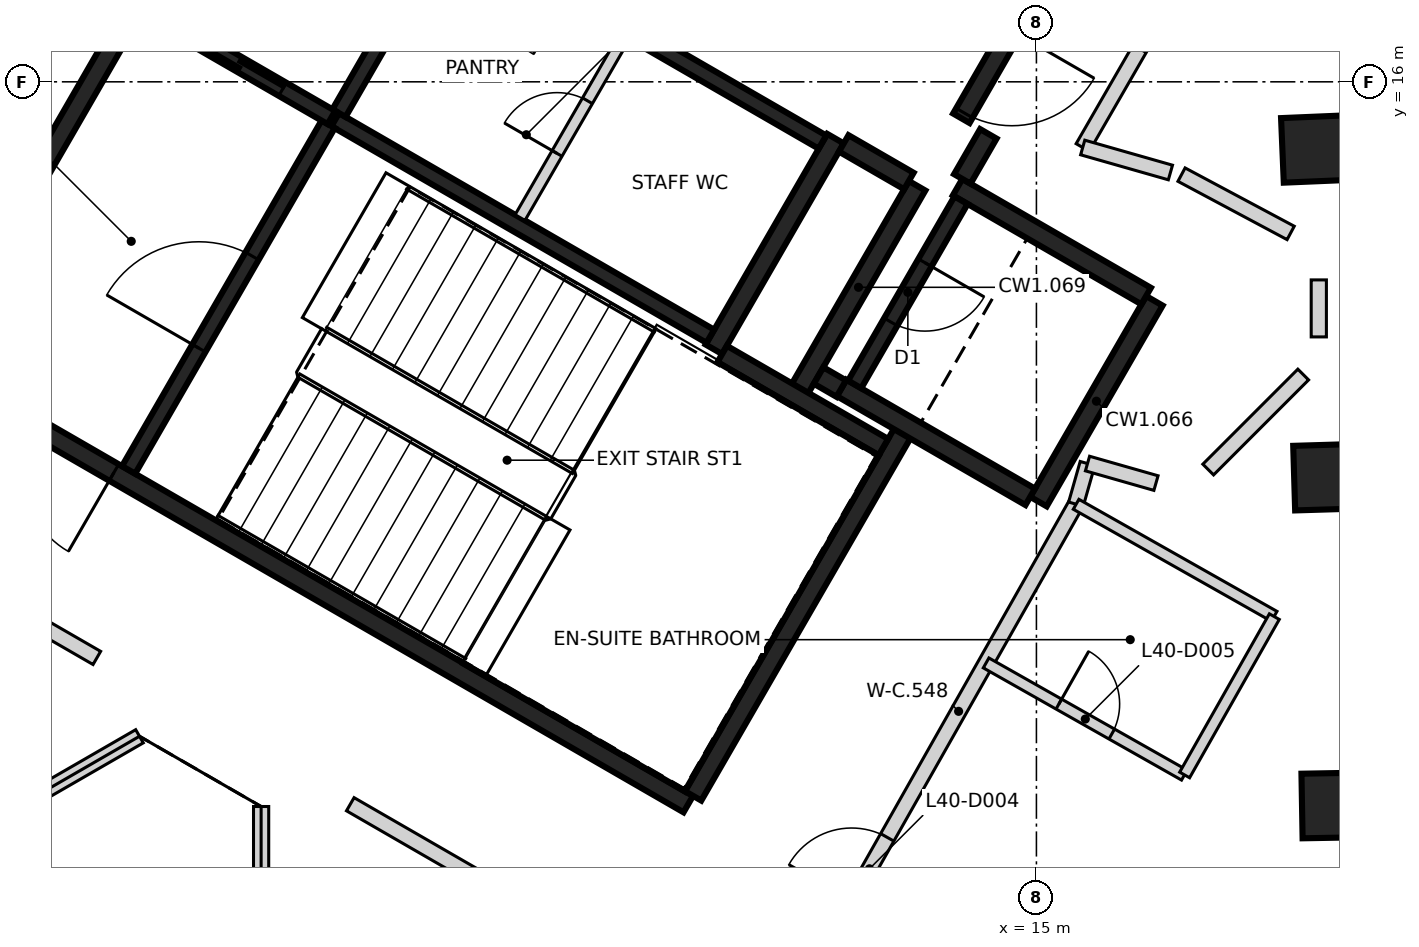
"""IFC4 building model, lengths in metres.
Left out: names, types, materials, properties, quantities, classifications, styles, units other than length and angle.
Written with IfcOpenShell. Run it as: python <this file> out.ifc"""

import sys

from ifc_helpers import new_model, si_unit, direction, frame, frame_2d, origin, origin_2d, place, context, subcontext, project, spatial, rectangle, extrude, element, fill, save


model = new_model("IFC4")
c1 = context("Model", 3, precision=1e-05, world=origin(), true_north=direction((0.0, 1.0)))
c2 = subcontext(c1, "Body", "Model", "MODEL_VIEW")
j1 = project(units=[si_unit("LENGTHUNIT", "METRE"), si_unit("PLANEANGLEUNIT", "RADIAN")], contexts=[c1])
p1 = place(None, origin())
s1 = spatial("IfcSite", under=j1, at=p1, CompositionType="ELEMENT")
p2 = place(p1, origin())
s2 = spatial("IfcBuilding", under=s1, at=p2, CompositionType="ELEMENT")
p3 = place(p2, frame((0.0, 0.0, 161.2)))
s3 = spatial("IfcBuildingStorey", under=s2, at=p3, CompositionType="ELEMENT", Elevation=161.2)
for number, where, z_axis, x_axis in (
    (1, (19.119, 6.484, -0.4), (0.0, 0.0, 1.0), (1.0, 0.018, 0.0)),
    (2, (19.016, 10.805, -0.4), (0.0, 0.0, 1.0), (1.0, 0.03, 0.0)),
    (3, (18.861, 15.124, -0.4), (0.0, 0.0, 1.0), (0.999, 0.042, 0.0)),
):
    element("IfcColumn", number, at=place(p3, frame(where, z_axis=z_axis, x_axis=x_axis)), inside=s3, PredefinedType="COLUMN", context=c2, shape_type="SweptSolid", body=[
        extrude(rectangle(XDim=1.25, YDim=0.85, at=origin_2d()), origin(), (0.0, 0.0, 1.0), 2.884),
    ])
p4 = place(p3, frame((10.42, 6.498, 0.0), z_axis=(0.0, 0.0, 1.0), x_axis=(-0.866021906294, 0.500006057782, 0.0)))
e4 = element("IfcWall", 4, at=p4, inside=s3, PredefinedType="SHEAR", context=c2, shape_type="SweptSolid", body=[
    extrude(rectangle(XDim=11.55, YDim=0.25, at=frame_2d((5.775, 0.0))), origin(), (0.0, 0.0, 1.0), 3.2),
])
p5 = place(p4, frame((10.025, 0.0, 0.0)))
e5 = element("IfcOpeningElement", 5, at=p5, cuts=e4, PredefinedType="OPENING", context=c2, shape_type="SweptSolid", body=[
    extrude(rectangle(XDim=1.2, YDim=2.1, at=frame_2d((0.6, 1.05))), frame((0.0, 0.135, 0.0), z_axis=(0.0, -1.0, 0.0), x_axis=(1.0, 0.0, 0.0)), (0.0, 0.0, 1.0), 0.27),
])
p6 = place(p4, frame((8.725, 0.0, 0.0)))
e6 = element("IfcOpeningElement", 6, at=p6, cuts=e4, PredefinedType="OPENING", context=c2, shape_type="SweptSolid", body=[
    extrude(rectangle(XDim=1.2, YDim=2.1, at=frame_2d((0.6, 1.05))), frame((0.0, 0.135, 0.0), z_axis=(0.0, -1.0, 0.0), x_axis=(1.0, 0.0, 0.0)), (0.0, 0.0, 1.0), 0.27),
])
p7 = place(p3, frame((0.48, 12.381, 0.0), z_axis=(0.0, 0.0, 1.0), x_axis=(0.49999885962, 0.866026062182, 0.0)))
e7 = element("IfcWall", 7, at=p7, inside=s3, PredefinedType="SHEAR", context=c2, shape_type="SweptSolid", body=[
    extrude(rectangle(XDim=5.225, YDim=0.25, at=frame_2d((2.612, 0.0))), origin(), (0.0, 0.0, 1.0), 3.2),
])
p8 = place(p3, frame((13.238, 11.378, 0.0), z_axis=(0.0, 0.0, 1.0), x_axis=(-0.500008851346, -0.866020293397, 0.0)))
e8 = element("IfcWall", 8, at=p8, inside=s3, PredefinedType="SHEAR", context=c2, shape_type="SweptSolid", body=[
    extrude(rectangle(XDim=5.51, YDim=0.25, at=frame_2d((2.755, 0.0))), origin(), (0.0, 0.0, 1.0), 3.2),
])
p9 = place(p3, frame((12.357, 15.252, 0.0), z_axis=(0.0, 0.0, 1.0), x_axis=(-0.500028443584, -0.866008981251, 0.0)))
e9 = element("IfcWall", 9, at=p9, inside=s3, PredefinedType="SHEAR", context=c2, shape_type="SweptSolid", body=[
    extrude(rectangle(XDim=3.2, YDim=0.25, at=frame_2d((1.6, 0.0))), origin(), (0.0, 0.0, 1.0), 3.2),
])
p10 = place(p3, frame((16.552, 13.119, 0.0), z_axis=(0.0, 0.0, 1.0), x_axis=(-0.499978833458, -0.866037623948, 0.0)))
e10 = element("IfcWall", 10, at=p10, inside=s3, PredefinedType="SHEAR", context=c2, shape_type="SweptSolid", body=[
    extrude(rectangle(XDim=3.05, YDim=0.25, at=frame_2d((1.525, 0.0))), origin(), (0.0, 0.0, 1.0), 3.2),
])
p11 = place(p3, frame((14.918, 10.54, 0.0), z_axis=(0.0, 0.0, 1.0), x_axis=(-0.866063538972, 0.499933942099, 0.0)))
e11 = element("IfcWall", 11, at=p11, inside=s3, PredefinedType="SHEAR", context=c2, shape_type="SweptSolid", body=[
    extrude(rectangle(XDim=2.865, YDim=0.25, at=frame_2d((1.432, 0.0))), origin(), (0.0, 0.0, 1.0), 3.2),
])
p12 = place(p3, frame((13.963, 14.614, 0.0), z_axis=(0.0, 0.0, 1.0), x_axis=(0.866042235819, -0.499970844928, 0.0)))
e12 = element("IfcWall", 12, at=p12, inside=s3, PredefinedType="SHEAR", context=c2, shape_type="SweptSolid", body=[
    extrude(rectangle(XDim=2.865, YDim=0.25, at=frame_2d((1.432, 0.0))), origin(), (0.0, 0.0, 1.0), 3.2),
])
p13 = place(p3, frame((11.888, 11.961, 0.0), z_axis=(0.0, 0.0, 1.0), x_axis=(0.500003324108, 0.866023484601, 0.0)))
e13 = element("IfcWall", 13, at=p13, inside=s3, PredefinedType="SHEAR", context=c2, shape_type="SweptSolid", body=[
    extrude(rectangle(XDim=3.085, YDim=0.25, at=frame_2d((1.542, 0.0))), origin(), (0.0, 0.0, 1.0), 3.2),
])
p14 = place(p3, frame((10.865, 12.418, 0.0), z_axis=(0.0, 0.0, 1.0), x_axis=(0.866026229868, -0.499998569178, 0.0)))
e14 = element("IfcWall", 14, at=p14, inside=s3, PredefinedType="SHEAR", context=c2, shape_type="SweptSolid", body=[
    extrude(rectangle(XDim=2.449, YDim=0.25, at=frame_2d((1.225, 0.0))), origin(), (0.0, 0.0, 1.0), 3.2),
])
p15 = place(p3, frame((14.945, 17.135, 0.0), z_axis=(0.0, 0.0, 1.0), x_axis=(-0.499983108224, -0.866035156036, 0.0)))
e15 = element("IfcWall", 15, at=p15, inside=s3, PredefinedType="SHEAR", context=c2, shape_type="SweptSolid", body=[
    extrude(rectangle(XDim=1.865, YDim=0.25, at=frame_2d((0.932, 0.0))), origin(), (0.0, 0.0, 1.0), 3.2),
])
p16 = place(p15, frame((0.535, 0.0, 0.0)))
e16 = element("IfcOpeningElement", 16, at=p16, cuts=e15, PredefinedType="OPENING", context=c2, shape_type="SweptSolid", body=[
    extrude(rectangle(XDim=1.25, YDim=2.1, at=frame_2d((0.625, 1.05))), frame((0.0, 0.135, 0.0), z_axis=(0.0, -1.0, 0.0), x_axis=(1.0, 0.0, 0.0)), (0.0, 0.0, 1.0), 0.27),
])
p17 = place(p3, frame((13.322, 14.695, 0.0), z_axis=(0.0, 0.0, 1.0), x_axis=(-0.866017078145, 0.500014420154, 0.0)))
e17 = element("IfcWall", 17, at=p17, inside=s3, PredefinedType="SHEAR", context=c2, shape_type="SweptSolid", body=[
    extrude(rectangle(XDim=0.989, YDim=0.25, at=frame_2d((0.495, 0.0))), origin(), (0.0, 0.0, 1.0), 3.2),
])
p18 = place(p3, frame((14.368, 15.315, 0.0), z_axis=(0.0, 0.0, 1.0), x_axis=(-0.499897359611, -0.866084655132, 0.0)))
e18 = element("IfcWall", 18, at=p18, inside=s3, PredefinedType="SHEAR", context=c2, shape_type="SweptSolid", body=[
    extrude(rectangle(XDim=0.685, YDim=0.25, at=frame_2d((0.342, 0.0))), origin(), (0.0, 0.0, 1.0), 3.2),
])
p19 = place(p3, frame((12.433, 11.964, 0.0), z_axis=(0.0, 0.0, 1.0), x_axis=(-0.866055875208, 0.499947218231, 0.0)))
e19 = element("IfcWall", 19, at=p19, inside=s3, PredefinedType="SHEAR", context=c2, shape_type="SweptSolid", body=[
    extrude(rectangle(XDim=0.345, YDim=0.25, at=frame_2d((0.172, 0.0))), origin(), (0.0, 0.0, 1.0), 3.2),
])
p20 = place(p3, frame((5.775, 15.502, 0.0), z_axis=(0.0, 0.0, 1.0), x_axis=(0.866020080793, -0.500009219579, 0.0)))
e20 = element("IfcWall", 20, at=p20, inside=s3, PredefinedType="SHEAR", context=c2, shape_type="SweptSolid", body=[
    extrude(rectangle(XDim=5.699, YDim=0.2, at=frame_2d((2.85, 0.0))), origin(), (0.0, 0.0, 1.0), 3.2),
])
p21 = place(p3, frame((12.185, 15.207, 0.0), z_axis=(0.0, 0.0, 1.0), x_axis=(-0.866020080793, 0.500009219579, 0.0)))
e21 = element("IfcWall", 21, at=p21, inside=s3, PredefinedType="SHEAR", context=c2, shape_type="SweptSolid", body=[
    extrude(rectangle(XDim=5.699, YDim=0.2, at=frame_2d((2.85, 0.0))), origin(), (0.0, 0.0, 1.0), 3.2),
])
p22 = place(p21, frame((3.874, 0.0, 0.0)))
e22 = element("IfcOpeningElement", 22, at=p22, cuts=e21, PredefinedType="OPENING", context=c2, shape_type="SweptSolid", body=[
    extrude(rectangle(XDim=0.9, YDim=2.1, at=frame_2d((0.45, 1.05))), frame((0.0, 0.11, 0.0), z_axis=(0.0, -1.0, 0.0), x_axis=(1.0, 0.0, 0.0)), (0.0, 0.0, 1.0), 0.22),
])
p23 = place(p3, frame((3.057, 10.895, 0.0), z_axis=(0.0, 0.0, 1.0), x_axis=(0.499989418164, 0.866031513124, 0.0)))
e23 = element("IfcWall", 23, at=p23, inside=s3, PredefinedType="SHEAR", context=c2, shape_type="SweptSolid", body=[
    extrude(rectangle(XDim=5.251, YDim=0.2, at=frame_2d((2.625, 0.0))), origin(), (0.0, 0.0, 1.0), 3.2),
])
p24 = place(p23, frame((1.849, 0.0, 0.0)))
e24 = element("IfcOpeningElement", 24, at=p24, cuts=e23, PredefinedType="OPENING", context=c2, shape_type="SweptSolid", body=[
    extrude(rectangle(XDim=1.4, YDim=2.1, at=frame_2d((0.7, 1.05))), frame((0.0, 0.11, 0.0), z_axis=(0.0, -1.0, 0.0), x_axis=(1.0, 0.0, 0.0)), (0.0, 0.0, 1.0), 0.22),
])
p25 = place(p3, frame((14.008, 14.442, 0.0), z_axis=(0.0, 0.0, 1.0), x_axis=(-0.499986818241, -0.866033014143, 0.0)))
e25 = element("IfcWall", 25, at=p25, inside=s3, PredefinedType="SHEAR", context=c2, shape_type="SweptSolid", body=[
    extrude(rectangle(XDim=2.798, YDim=0.2, at=frame_2d((1.399, 0.0))), origin(), (0.0, 0.0, 1.0), 3.2),
])
p26 = place(p25, frame((0.949, 0.0, 0.0)))
e26 = element("IfcOpeningElement", 26, at=p26, cuts=e25, PredefinedType="OPENING", context=c2, shape_type="SweptSolid", body=[
    extrude(rectangle(XDim=0.9, YDim=2.1, at=frame_2d((0.45, 1.05))), frame((0.0, 0.11, 0.0), z_axis=(0.0, -1.0, 0.0), x_axis=(1.0, 0.0, 0.0)), (0.0, 0.0, 1.0), 0.22),
])
p27 = place(p3, frame((7.199, 17.97, 0.0), z_axis=(0.0, 0.0, 1.0), x_axis=(-0.499968400327, -0.866043647095, 0.0)))
e27 = element("IfcWall", 27, at=p27, inside=s3, PredefinedType="SHEAR", context=c2, shape_type="SweptSolid", body=[
    extrude(rectangle(XDim=2.75, YDim=0.2, at=frame_2d((1.375, 0.0))), origin(), (0.0, 0.0, 1.0), 3.2),
])
p28 = place(p3, frame((5.725, 15.531, 0.0), z_axis=(0.0, 0.0, 1.0), x_axis=(-0.866037306777, 0.499979382845, 0.0)))
e28 = element("IfcWall", 28, at=p28, inside=s3, PredefinedType="SHEAR", context=c2, shape_type="SweptSolid", body=[
    extrude(rectangle(XDim=2.742, YDim=0.2, at=frame_2d((1.371, 0.0))), origin(), (0.0, 0.0, 1.0), 3.2),
])
p29 = place(p28, frame((0.743, 0.0, 0.0)))
e29 = element("IfcOpeningElement", 29, at=p29, cuts=e28, PredefinedType="OPENING", context=c2, shape_type="SweptSolid", body=[
    extrude(rectangle(XDim=1.3, YDim=2.1, at=frame_2d((0.65, 1.05))), frame((0.0, 0.11, 0.0), z_axis=(0.0, -1.0, 0.0), x_axis=(1.0, 0.0, 0.0)), (0.0, 0.0, 1.0), 0.22),
])
p30 = place(p3, frame((8.207, 14.214, 0.0), z_axis=(0.0, 0.0, 1.0), x_axis=(0.499922376475, 0.866070215109, 0.0)))
e30 = element("IfcWall", 30, at=p30, inside=s3, PredefinedType="PARTITIONING", context=c2, shape_type="SweptSolid", body=[
    extrude(rectangle(XDim=2.749, YDim=0.15, at=frame_2d((1.374, 0.0))), origin(), (0.0, 0.0, 1.0), 3.2),
])
p31 = place(p30, frame((0.974, 0.0, 0.0)))
e31 = element("IfcOpeningElement", 31, at=p31, cuts=e30, PredefinedType="OPENING", context=c2, shape_type="SweptSolid", body=[
    extrude(rectangle(XDim=0.8, YDim=2.1, at=frame_2d((0.4, 1.05))), frame((0.0, 0.085, 0.0), z_axis=(0.0, -1.0, 0.0), x_axis=(1.0, 0.0, 0.0)), (0.0, 0.0, 1.0), 0.17),
])
p32 = place(p3, frame((0.612, 9.591, 0.0), z_axis=(0.0, 0.0, 1.0), x_axis=(0.866077886601, -0.499909086075, 0.0)))
e32 = element("IfcWall", 32, at=p32, inside=s3, PredefinedType="PARTITIONING", context=c2, shape_type="SweptSolid", body=[
    extrude(rectangle(XDim=2.34, YDim=0.2, at=frame_2d((1.17, 0.0))), origin(), (0.0, 0.0, 1.0), 3.2),
])
p33 = place(p3, frame((5.973, 6.496, 0.0), z_axis=(0.0, 0.0, 1.0), x_axis=(0.866058792507, -0.499942164577, 0.0)))
e33 = element("IfcWall", 33, at=p33, inside=s3, PredefinedType="PARTITIONING", context=c2, shape_type="SweptSolid", body=[
    extrude(rectangle(XDim=2.341, YDim=0.2, at=frame_2d((1.17, 0.0))), origin(), (0.0, 0.0, 1.0), 3.2),
])
p34 = place(p3, frame((12.433, 4.992, 0.0), z_axis=(0.0, 0.0, 1.0), x_axis=(0.492618265192, 0.870245508348, 0.0)))
e34 = element("IfcWall", 34, at=p34, inside=s3, PredefinedType="PARTITIONING", context=c2, shape_type="SweptSolid", body=[
    extrude(rectangle(XDim=6.265, YDim=0.2, at=frame_2d((3.133, 0.0))), origin(), (0.0, 0.0, 1.0), 3.2),
])
p35 = place(p34, frame((0.277, 0.0, 0.0)))
e35 = element("IfcOpeningElement", 35, at=p35, cuts=e34, PredefinedType="OPENING", context=c2, shape_type="SweptSolid", body=[
    extrude(rectangle(XDim=0.95, YDim=2.1, at=frame_2d((0.475, 1.05))), frame((0.0, 0.11, 0.0), z_axis=(0.0, -1.0, 0.0), x_axis=(1.0, 0.0, 0.0)), (0.0, 0.0, 1.0), 0.22),
])
p36 = place(p3, frame((15.156, 17.13, 0.0), z_axis=(0.0, 0.0, 1.0), x_axis=(0.865755062894, -0.500467952093, 0.0)))
e36 = element("IfcWall", 36, at=p36, inside=s3, PredefinedType="PARTITIONING", context=c2, shape_type="SweptSolid", body=[
    extrude(rectangle(XDim=1.389, YDim=0.2, at=frame_2d((0.694, 0.0))), origin(), (0.0, 0.0, 1.0), 3.2),
])
p37 = place(p3, frame((15.52, 10.444, 0.0), z_axis=(0.0, 0.0, 1.0), x_axis=(0.273965995931, 0.961739378976, 0.0)))
e37 = element("IfcWall", 37, at=p37, inside=s3, PredefinedType="PARTITIONING", context=c2, shape_type="SweptSolid", body=[
    extrude(rectangle(XDim=0.555, YDim=0.2, at=frame_2d((0.278, 0.0))), origin(), (0.0, 0.0, 1.0), 3.2),
])
p38 = place(p3, frame((15.609, 15.136, 0.0), z_axis=(0.0, 0.0, 1.0), x_axis=(0.499501622561, 0.866312950993, 0.0)))
e38 = element("IfcWall", 38, at=p38, inside=s3, PredefinedType="PARTITIONING", context=c2, shape_type="SweptSolid", body=[
    extrude(rectangle(XDim=1.5, YDim=0.2, at=frame_2d((0.75, 0.0))), origin(), (0.0, 0.0, 1.0), 3.2),
])
p39 = place(p3, frame((15.609, 15.136, 0.0), z_axis=(0.0, 0.0, 1.0), x_axis=(0.961662011825, -0.274237442763, 0.0)))
e39 = element("IfcWall", 39, at=p39, inside=s3, PredefinedType="PARTITIONING", context=c2, shape_type="SweptSolid", body=[
    extrude(rectangle(XDim=1.2, YDim=0.2, at=frame_2d((0.6, 0.0))), origin(), (0.0, 0.0, 1.0), 3.2),
])
p40 = place(p3, frame((15.672, 10.978, 0.0), z_axis=(0.0, 0.0, 1.0), x_axis=(0.961612403256, -0.274411344344, 0.0)))
e40 = element("IfcWall", 40, at=p40, inside=s3, PredefinedType="PARTITIONING", context=c2, shape_type="SweptSolid", body=[
    extrude(rectangle(XDim=0.937, YDim=0.2, at=frame_2d((0.468, 0.0))), origin(), (0.0, 0.0, 1.0), 3.2),
])
p41 = place(p3, frame((16.909, 14.779, 0.0), z_axis=(0.0, 0.0, 1.0), x_axis=(0.882045575366, -0.471164093472, 0.0)))
e41 = element("IfcWall", 41, at=p41, inside=s3, PredefinedType="PARTITIONING", context=c2, shape_type="SweptSolid", body=[
    extrude(rectangle(XDim=1.628, YDim=0.2, at=frame_2d((0.814, 0.0))), origin(), (0.0, 0.0, 1.0), 3.2),
])
p42 = place(p3, frame((17.26, 10.899, 0.0), z_axis=(0.0, 0.0, 1.0), x_axis=(0.707106781187, 0.707106781187, 0.0)))
e42 = element("IfcWall", 42, at=p42, inside=s3, PredefinedType="PARTITIONING", context=c2, shape_type="SweptSolid", body=[
    extrude(rectangle(XDim=1.768, YDim=0.2, at=frame_2d((0.884, 0.0))), origin(), (0.0, 0.0, 1.0), 3.2),
])
p43 = place(p3, frame((18.715, 12.644, 0.0), z_axis=(0.0, 0.0, 1.0), x_axis=(0.0, 1.0, 0.0)))
e43 = element("IfcWall", 43, at=p43, inside=s3, PredefinedType="PARTITIONING", context=c2, shape_type="SweptSolid", body=[
    extrude(rectangle(XDim=0.75, YDim=0.2, at=frame_2d((0.375, 0.0))), origin(), (0.0, 0.0, 1.0), 3.2),
])
p44 = place(p3, frame((-8.0, 0.924, 0.0), z_axis=(0.0, 0.0, 1.0), x_axis=(0.86604129137, 0.499972480886, 0.0)))
e44 = element("IfcWall", 44, at=p44, inside=s3, PredefinedType="PARTITIONING", context=c2, shape_type="SweptSolid", body=[
    extrude(rectangle(XDim=12.932, YDim=0.2, at=frame_2d((6.466, 0.0))), origin(), (0.0, 0.0, 1.0), 2.3),
])
p45 = place(p3, frame((4.8, -6.466, 0.0), z_axis=(0.0, 0.0, 1.0), x_axis=(0.0, 1.0, 0.0)))
e45 = element("IfcWall", 45, at=p45, inside=s3, PredefinedType="PARTITIONING", context=c2, shape_type="SweptSolid", body=[
    extrude(rectangle(XDim=12.932, YDim=0.2, at=frame_2d((6.466, 0.0))), origin(), (0.0, 0.0, 1.0), 2.3),
])
p46 = place(p3, frame((14.338, 8.355, 0.0), z_axis=(0.0, 0.0, 1.0), x_axis=(0.870291117047, -0.49253768545, 0.0)))
e46 = element("IfcWall", 46, at=p46, inside=s3, PredefinedType="PARTITIONING", context=c2, shape_type="SweptSolid", body=[
    extrude(rectangle(XDim=2.997, YDim=0.15, at=frame_2d((1.499, 0.0))), origin(), (0.0, 0.0, 1.0), 3.2),
])
p47 = place(p46, frame((1.1, 0.0, 0.0)))
e47 = element("IfcOpeningElement", 47, at=p47, cuts=e46, PredefinedType="OPENING", context=c2, shape_type="SweptSolid", body=[
    extrude(rectangle(XDim=0.8, YDim=2.1, at=frame_2d((0.4, 1.05))), frame((0.0, 0.085, 0.0), z_axis=(0.0, -1.0, 0.0), x_axis=(1.0, 0.0, 0.0)), (0.0, 0.0, 1.0), 0.17),
])
p48 = place(p3, frame((15.522, 10.442, 0.0), z_axis=(0.0, 0.0, 1.0), x_axis=(0.870427634909, -0.492296386729, 0.0)))
e48 = element("IfcWall", 48, at=p48, inside=s3, PredefinedType="PARTITIONING", context=c2, shape_type="SweptSolid", body=[
    extrude(rectangle(XDim=2.994, YDim=0.15, at=frame_2d((1.497, 0.0))), origin(), (0.0, 0.0, 1.0), 3.2),
])
p49 = place(p3, frame((16.95, 6.881, 0.0), z_axis=(0.0, 0.0, 1.0), x_axis=(0.49287361781, 0.870100911887, 0.0)))
e49 = element("IfcWall", 49, at=p49, inside=s3, PredefinedType="PARTITIONING", context=c2, shape_type="SweptSolid", body=[
    extrude(rectangle(XDim=2.394, YDim=0.15, at=frame_2d((1.197, 0.0))), origin(), (0.0, 0.0, 1.0), 3.2),
])
p50 = place(p29, origin())
e50 = element("IfcDoor", 50, at=p50, inside=s3, OperationType="SLIDING_TO_LEFT", PredefinedType="DOOR", context=c2, shape_type="SweptSolid", body=[
    extrude(rectangle(XDim=1.3, YDim=2.1, at=frame_2d((0.65, 1.05))), frame((0.0, 0.025, 0.0), z_axis=(0.0, -1.0, 0.0), x_axis=(1.0, 0.0, 0.0)), (0.0, 0.0, 1.0), 0.05),
])
fill(e29, e50)
p51 = place(p16, origin())
e51 = element("IfcDoor", 51, at=p51, inside=s3, OperationType="SINGLE_SWING_LEFT", PredefinedType="DOOR", context=c2, shape_type="SweptSolid", body=[
    extrude(rectangle(XDim=1.25, YDim=2.1, at=frame_2d((0.625, 1.05))), frame((0.0, 0.025, 0.0), z_axis=(0.0, -1.0, 0.0), x_axis=(1.0, 0.0, 0.0)), (0.0, 0.0, 1.0), 0.05),
])
fill(e16, e51)
p52 = place(p6, origin())
e52 = element("IfcDoor", 52, at=p52, inside=s3, OperationType="SINGLE_SWING_RIGHT", PredefinedType="DOOR", context=c2, shape_type="SweptSolid", body=[
    extrude(rectangle(XDim=1.2, YDim=2.1, at=frame_2d((0.6, 1.05))), frame((0.0, 0.025, 0.0), z_axis=(0.0, -1.0, 0.0), x_axis=(1.0, 0.0, 0.0)), (0.0, 0.0, 1.0), 0.05),
])
fill(e6, e52)
p53 = place(p24, origin())
e53 = element("IfcDoor", 53, at=p53, inside=s3, OperationType="SINGLE_SWING_LEFT", PredefinedType="DOOR", context=c2, shape_type="SweptSolid", body=[
    extrude(rectangle(XDim=1.4, YDim=2.1, at=frame_2d((0.7, 1.05))), frame((0.0, 0.025, 0.0), z_axis=(0.0, -1.0, 0.0), x_axis=(1.0, 0.0, 0.0)), (0.0, 0.0, 1.0), 0.05),
])
fill(e24, e53)
p54 = place(p26, origin())
e54 = element("IfcDoor", 54, at=p54, inside=s3, OperationType="SINGLE_SWING_LEFT", PredefinedType="DOOR", context=c2, shape_type="SweptSolid", body=[
    extrude(rectangle(XDim=0.9, YDim=2.1, at=frame_2d((0.45, 1.05))), frame((0.0, 0.025, 0.0), z_axis=(0.0, -1.0, 0.0), x_axis=(1.0, 0.0, 0.0)), (0.0, 0.0, 1.0), 0.05),
])
fill(e26, e54)
p55 = place(p31, origin())
e55 = element("IfcDoor", 55, at=p55, inside=s3, OperationType="SINGLE_SWING_RIGHT", PredefinedType="DOOR", context=c2, shape_type="SweptSolid", body=[
    extrude(rectangle(XDim=0.8, YDim=2.1, at=frame_2d((0.4, 1.05))), frame((0.0, 0.025, 0.0), z_axis=(0.0, -1.0, 0.0), x_axis=(1.0, 0.0, 0.0)), (0.0, 0.0, 1.0), 0.05),
])
fill(e31, e55)
p56 = place(p35, origin())
e56 = element("IfcDoor", 56, at=p56, inside=s3, OperationType="SINGLE_SWING_LEFT", PredefinedType="DOOR", context=c2, shape_type="SweptSolid", body=[
    extrude(rectangle(XDim=0.95, YDim=2.1, at=frame_2d((0.475, 1.05))), frame((0.0, 0.025, 0.0), z_axis=(0.0, -1.0, 0.0), x_axis=(1.0, 0.0, 0.0)), (0.0, 0.0, 1.0), 0.05),
])
fill(e35, e56)
p57 = place(p47, origin())
e57 = element("IfcDoor", 57, at=p57, inside=s3, OperationType="SINGLE_SWING_LEFT", PredefinedType="DOOR", context=c2, shape_type="SweptSolid", body=[
    extrude(rectangle(XDim=0.8, YDim=2.1, at=frame_2d((0.4, 1.05))), frame((0.0, 0.025, 0.0), z_axis=(0.0, -1.0, 0.0), x_axis=(1.0, 0.0, 0.0)), (0.0, 0.0, 1.0), 0.05),
])
fill(e47, e57)
save(model, sys.argv[1])
